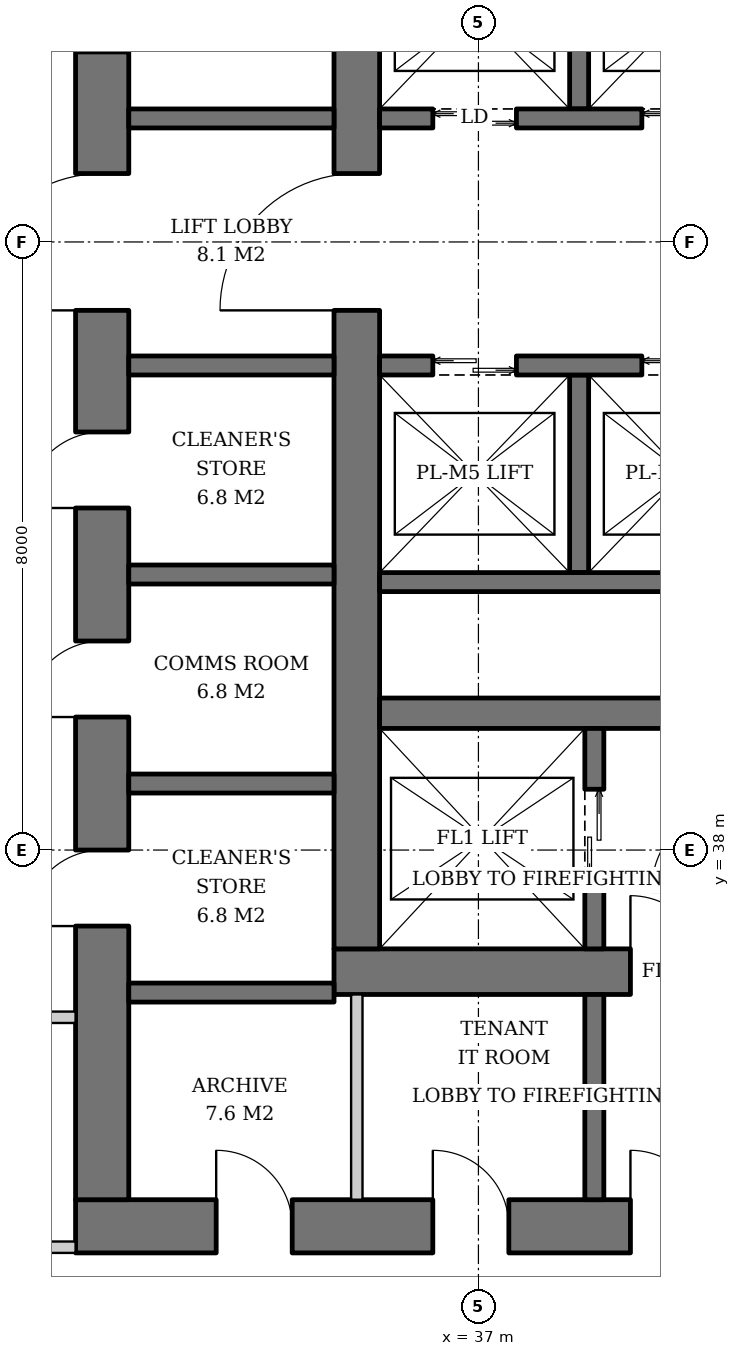
"""IFC4 building model, lengths in metres.
Left out: names, types, materials, properties, quantities, classifications, styles, units other than length and angle.
Written with IfcOpenShell. Run it as: python <this file> out.ifc"""

import sys

from ifc_helpers import new_model, si_unit, direction, frame, frame_2d, origin, place, context, subcontext, project, spatial, rectangle, extrude, element, fill, save


model = new_model("IFC4")
c1 = context("Model", 3, precision=1e-05, world=origin(), true_north=direction((0.0, 1.0)))
c2 = subcontext(c1, "Body", "Model", "MODEL_VIEW")
j1 = project(units=[si_unit("LENGTHUNIT", "METRE"), si_unit("PLANEANGLEUNIT", "RADIAN")], contexts=[c1])
p1 = place(None, origin())
s1 = spatial("IfcSite", under=j1, at=p1, CompositionType="ELEMENT")
p2 = place(p1, origin())
s2 = spatial("IfcBuilding", under=s1, at=p2, CompositionType="ELEMENT")
p3 = place(p2, frame((0.0, 0.0, 150.2)))
s3 = spatial("IfcBuildingStorey", under=s2, at=p3, CompositionType="ELEMENT", Elevation=150.2)
p4 = place(p3, frame((35.1, 36.4, 0.0), z_axis=(0.0, 0.0, 1.0), x_axis=(1.0, 0.0, 0.0)))
e1 = element("IfcWall", 1, at=p4, inside=s3, PredefinedType="SHEAR", context=c2, shape_type="SweptSolid", body=[
    extrude(rectangle(XDim=19.8, YDim=0.6, at=frame_2d((9.9, 0.0))), origin(), (0.0, 0.0, 1.0), 3.8),
])
p5 = place(p4, frame((3.9, 0.0, 0.0)))
e2 = element("IfcOpeningElement", 2, at=p5, cuts=e1, PredefinedType="OPENING", context=c2, shape_type="SweptSolid", body=[
    extrude(rectangle(XDim=1.0, YDim=2.1, at=frame_2d((0.5, 1.05))), frame((0.0, 0.31, 0.0), z_axis=(0.0, -1.0, 0.0), x_axis=(1.0, 0.0, 0.0)), (0.0, 0.0, 1.0), 0.62),
])
p6 = place(p4, frame((15.35, 0.0, 0.0)))
e3 = element("IfcOpeningElement", 3, at=p6, cuts=e1, PredefinedType="OPENING", context=c2, shape_type="SweptSolid", body=[
    extrude(rectangle(XDim=1.0, YDim=2.1, at=frame_2d((0.5, 1.05))), frame((0.0, 0.31, 0.0), z_axis=(0.0, -1.0, 0.0), x_axis=(1.0, 0.0, 0.0)), (0.0, 0.0, 1.0), 0.62),
])
p7 = place(p3, frame((35.4, 36.7, 0.0), z_axis=(0.0, 0.0, 1.0), x_axis=(0.0, 1.0, 0.0)))
e4 = element("IfcWall", 4, at=p7, inside=s3, PredefinedType="SHEAR", context=c2, shape_type="SweptSolid", body=[
    extrude(rectangle(XDim=18.6, YDim=0.6, at=frame_2d((9.3, 0.0))), origin(), (0.0, 0.0, 1.0), 3.8),
])
p8 = place(p7, frame((8.4, 0.0, 0.0)))
e5 = element("IfcOpeningElement", 5, at=p8, cuts=e4, PredefinedType="OPENING", context=c2, shape_type="SweptSolid", body=[
    extrude(rectangle(XDim=1.8, YDim=2.4, at=frame_2d((0.9, 1.2))), frame((0.0, 0.31, 0.0), z_axis=(0.0, -1.0, 0.0), x_axis=(1.0, 0.0, 0.0)), (0.0, 0.0, 1.0), 0.62),
])
p9 = place(p3, frame((31.7, 33.05, 0.0), z_axis=(0.0, 0.0, 1.0), x_axis=(1.0, 0.0, 0.0)))
e6 = element("IfcWall", 6, at=p9, inside=s3, PredefinedType="SHEAR", context=c2, shape_type="SweptSolid", body=[
    extrude(rectangle(XDim=26.6, YDim=0.7, at=frame_2d((13.3, 0.0))), origin(), (0.0, 0.0, 1.0), 3.8),
])
p10 = place(p9, frame((7.3, 0.0, 0.0)))
e7 = element("IfcOpeningElement", 7, at=p10, cuts=e6, PredefinedType="OPENING", context=c2, shape_type="SweptSolid", body=[
    extrude(rectangle(XDim=1.0, YDim=2.1, at=frame_2d((0.5, 1.05))), frame((0.0, 0.36, 0.0), z_axis=(0.0, -1.0, 0.0), x_axis=(1.0, 0.0, 0.0)), (0.0, 0.0, 1.0), 0.72),
])
p11 = place(p9, frame((18.75, 0.0, 0.0)))
e8 = element("IfcOpeningElement", 8, at=p11, cuts=e6, PredefinedType="OPENING", context=c2, shape_type="SweptSolid", body=[
    extrude(rectangle(XDim=1.0, YDim=2.1, at=frame_2d((0.5, 1.05))), frame((0.0, 0.36, 0.0), z_axis=(0.0, -1.0, 0.0), x_axis=(1.0, 0.0, 0.0)), (0.0, 0.0, 1.0), 0.72),
])
p12 = place(p9, frame((1.85, 0.0, 0.0)))
e9 = element("IfcOpeningElement", 9, at=p12, cuts=e6, PredefinedType="OPENING", context=c2, shape_type="SweptSolid", body=[
    extrude(rectangle(XDim=1.0, YDim=2.1, at=frame_2d((0.5, 1.05))), frame((0.0, 0.36, 0.0), z_axis=(0.0, -1.0, 0.0), x_axis=(1.0, 0.0, 0.0)), (0.0, 0.0, 1.0), 0.72),
])
p13 = place(p9, frame((4.7, 0.0, 0.0)))
e10 = element("IfcOpeningElement", 10, at=p13, cuts=e6, PredefinedType="OPENING", context=c2, shape_type="SweptSolid", body=[
    extrude(rectangle(XDim=1.0, YDim=2.1, at=frame_2d((0.5, 1.05))), frame((0.0, 0.36, 0.0), z_axis=(0.0, -1.0, 0.0), x_axis=(1.0, 0.0, 0.0)), (0.0, 0.0, 1.0), 0.72),
])
p14 = place(p9, frame((12.44, 0.0, 0.0)))
e11 = element("IfcOpeningElement", 11, at=p14, cuts=e6, PredefinedType="OPENING", context=c2, shape_type="SweptSolid", body=[
    extrude(rectangle(XDim=1.0, YDim=2.1, at=frame_2d((0.5, 1.05))), frame((0.0, 0.36, 0.0), z_axis=(0.0, -1.0, 0.0), x_axis=(1.0, 0.0, 0.0)), (0.0, 0.0, 1.0), 0.72),
])
p15 = place(p9, frame((20.644, 0.0, 0.0)))
e12 = element("IfcOpeningElement", 12, at=p15, cuts=e6, PredefinedType="OPENING", context=c2, shape_type="SweptSolid", body=[
    extrude(rectangle(XDim=1.0, YDim=2.1, at=frame_2d((0.5, 1.05))), frame((0.0, 0.36, 0.0), z_axis=(0.0, -1.0, 0.0), x_axis=(1.0, 0.0, 0.0)), (0.0, 0.0, 1.0), 0.72),
])
p16 = place(p9, frame((23.544, 0.0, 0.0)))
e13 = element("IfcOpeningElement", 13, at=p16, cuts=e6, PredefinedType="OPENING", context=c2, shape_type="SweptSolid", body=[
    extrude(rectangle(XDim=1.0, YDim=2.1, at=frame_2d((0.5, 1.05))), frame((0.0, 0.36, 0.0), z_axis=(0.0, -1.0, 0.0), x_axis=(1.0, 0.0, 0.0)), (0.0, 0.0, 1.0), 0.72),
])
p17 = place(p3, frame((32.05, 33.4, 0.0), z_axis=(0.0, 0.0, 1.0), x_axis=(0.0, 1.0, 0.0)))
e14 = element("IfcWall", 14, at=p17, inside=s3, PredefinedType="SHEAR", context=c2, shape_type="SweptSolid", body=[
    extrude(rectangle(XDim=25.2, YDim=0.7, at=frame_2d((12.6, 0.0))), origin(), (0.0, 0.0, 1.0), 3.8),
])
p18 = place(p17, frame((11.7, 0.0, 0.0)))
e15 = element("IfcOpeningElement", 15, at=p18, cuts=e14, PredefinedType="OPENING", context=c2, shape_type="SweptSolid", body=[
    extrude(rectangle(XDim=1.8, YDim=2.4, at=frame_2d((0.9, 1.2))), frame((0.0, 0.36, 0.0), z_axis=(0.0, -1.0, 0.0), x_axis=(1.0, 0.0, 0.0)), (0.0, 0.0, 1.0), 0.72),
])
p19 = place(p17, frame((3.6, 0.0, 0.0)))
e16 = element("IfcOpeningElement", 16, at=p19, cuts=e14, PredefinedType="OPENING", context=c2, shape_type="SweptSolid", body=[
    extrude(rectangle(XDim=1.0, YDim=2.1, at=frame_2d((0.5, 1.05))), frame((0.0, 0.36, 0.0), z_axis=(0.0, -1.0, 0.0), x_axis=(1.0, 0.0, 0.0)), (0.0, 0.0, 1.0), 0.72),
])
p20 = place(p17, frame((6.35, 0.0, 0.0)))
e17 = element("IfcOpeningElement", 17, at=p20, cuts=e14, PredefinedType="OPENING", context=c2, shape_type="SweptSolid", body=[
    extrude(rectangle(XDim=1.0, YDim=2.1, at=frame_2d((0.5, 1.05))), frame((0.0, 0.36, 0.0), z_axis=(0.0, -1.0, 0.0), x_axis=(1.0, 0.0, 0.0)), (0.0, 0.0, 1.0), 0.72),
])
p21 = place(p17, frame((9.1, 0.0, 0.0)))
e18 = element("IfcOpeningElement", 18, at=p21, cuts=e14, PredefinedType="OPENING", context=c2, shape_type="SweptSolid", body=[
    extrude(rectangle(XDim=1.0, YDim=2.1, at=frame_2d((0.5, 1.05))), frame((0.0, 0.36, 0.0), z_axis=(0.0, -1.0, 0.0), x_axis=(1.0, 0.0, 0.0)), (0.0, 0.0, 1.0), 0.72),
])
p22 = place(p17, frame((15.1, 0.0, 0.0)))
e19 = element("IfcOpeningElement", 19, at=p22, cuts=e14, PredefinedType="OPENING", context=c2, shape_type="SweptSolid", body=[
    extrude(rectangle(XDim=1.0, YDim=2.1, at=frame_2d((0.5, 1.05))), frame((0.0, 0.36, 0.0), z_axis=(0.0, -1.0, 0.0), x_axis=(1.0, 0.0, 0.0)), (0.0, 0.0, 1.0), 0.72),
])
p23 = place(p17, frame((17.85, 0.0, 0.0)))
e20 = element("IfcOpeningElement", 20, at=p23, cuts=e14, PredefinedType="OPENING", context=c2, shape_type="SweptSolid", body=[
    extrude(rectangle(XDim=1.0, YDim=2.1, at=frame_2d((0.5, 1.05))), frame((0.0, 0.36, 0.0), z_axis=(0.0, -1.0, 0.0), x_axis=(1.0, 0.0, 0.0)), (0.0, 0.0, 1.0), 0.72),
])
p24 = place(p3, frame((35.7, 39.8, 0.0), z_axis=(0.0, 0.0, 1.0), x_axis=(1.0, 0.0, 0.0)))
e21 = element("IfcWall", 21, at=p24, inside=s3, PredefinedType="SHEAR", context=c2, shape_type="SweptSolid", body=[
    extrude(rectangle(XDim=18.6, YDim=0.4, at=frame_2d((9.3, 0.0))), origin(), (0.0, 0.0, 1.0), 3.8),
])
p25 = place(p3, frame((38.525, 36.7, 0.0), z_axis=(0.0, 0.0, 1.0), x_axis=(0.0, 1.0, 0.0)))
e22 = element("IfcWall", 22, at=p25, inside=s3, PredefinedType="SHEAR", context=c2, shape_type="SweptSolid", body=[
    extrude(rectangle(XDim=2.9, YDim=0.25, at=frame_2d((1.45, 0.0))), origin(), (0.0, 0.0, 1.0), 3.8),
])
p26 = place(p25, frame((0.8, 0.0, 0.0)))
e23 = element("IfcOpeningElement", 23, at=p26, cuts=e22, PredefinedType="OPENING", context=c2, shape_type="SweptSolid", body=[
    extrude(rectangle(XDim=1.3, YDim=2.2, at=frame_2d((0.65, 1.1))), frame((0.0, 0.135, 0.0), z_axis=(0.0, -1.0, 0.0), x_axis=(1.0, 0.0, 0.0)), (0.0, 0.0, 1.0), 0.27),
])
p27 = place(p3, frame((38.325, 47.75, 0.0), z_axis=(0.0, 0.0, 1.0), x_axis=(0.0, 1.0, 0.0)))
e24 = element("IfcWall", 24, at=p27, inside=s3, PredefinedType="SHEAR", context=c2, shape_type="SweptSolid", body=[
    extrude(rectangle(XDim=2.6, YDim=0.25, at=frame_2d((1.3, 0.0))), origin(), (0.0, 0.0, 1.0), 3.8),
])
p28 = place(p3, frame((35.7, 47.625, 0.0), z_axis=(0.0, 0.0, 1.0), x_axis=(1.0, 0.0, 0.0)))
e25 = element("IfcWall", 25, at=p28, inside=s3, PredefinedType="SHEAR", context=c2, shape_type="SweptSolid", body=[
    extrude(rectangle(XDim=12.83, YDim=0.25, at=frame_2d((6.415, 0.0))), origin(), (0.0, 0.0, 1.0), 3.8),
])
p29 = place(p28, frame((0.7, 0.0, 0.0)))
e26 = element("IfcOpeningElement", 26, at=p29, cuts=e25, PredefinedType="OPENING", context=c2, shape_type="SweptSolid", body=[
    extrude(rectangle(XDim=1.1, YDim=2.2, at=frame_2d((0.55, 1.1))), frame((0.0, 0.135, 0.0), z_axis=(0.0, -1.0, 0.0), x_axis=(1.0, 0.0, 0.0)), (0.0, 0.0, 1.0), 0.27),
])
p30 = place(p28, frame((3.45, 0.0, 0.0)))
e27 = element("IfcOpeningElement", 27, at=p30, cuts=e25, PredefinedType="OPENING", context=c2, shape_type="SweptSolid", body=[
    extrude(rectangle(XDim=1.1, YDim=2.2, at=frame_2d((0.55, 1.1))), frame((0.0, 0.135, 0.0), z_axis=(0.0, -1.0, 0.0), x_axis=(1.0, 0.0, 0.0)), (0.0, 0.0, 1.0), 0.27),
])
p31 = place(p28, frame((6.2, 0.0, 0.0)))
e28 = element("IfcOpeningElement", 28, at=p31, cuts=e25, PredefinedType="OPENING", context=c2, shape_type="SweptSolid", body=[
    extrude(rectangle(XDim=1.1, YDim=2.2, at=frame_2d((0.55, 1.1))), frame((0.0, 0.135, 0.0), z_axis=(0.0, -1.0, 0.0), x_axis=(1.0, 0.0, 0.0)), (0.0, 0.0, 1.0), 0.27),
])
p32 = place(p28, frame((8.95, 0.0, 0.0)))
e29 = element("IfcOpeningElement", 29, at=p32, cuts=e25, PredefinedType="OPENING", context=c2, shape_type="SweptSolid", body=[
    extrude(rectangle(XDim=1.1, YDim=2.2, at=frame_2d((0.55, 1.1))), frame((0.0, 0.135, 0.0), z_axis=(0.0, -1.0, 0.0), x_axis=(1.0, 0.0, 0.0)), (0.0, 0.0, 1.0), 0.27),
])
p33 = place(p28, frame((11.515, 0.0, 0.0)))
e30 = element("IfcOpeningElement", 30, at=p33, cuts=e25, PredefinedType="OPENING", context=c2, shape_type="SweptSolid", body=[
    extrude(rectangle(XDim=0.8, YDim=2.0, at=frame_2d((0.4, 1.0))), frame((0.0, 0.135, 0.0), z_axis=(0.0, -1.0, 0.0), x_axis=(1.0, 0.0, 0.0)), (0.0, 0.0, 1.0), 0.27),
])
p34 = place(p3, frame((38.325, 44.25, 0.0), z_axis=(0.0, 0.0, 1.0), x_axis=(0.0, -1.0, 0.0)))
e31 = element("IfcWall", 31, at=p34, inside=s3, PredefinedType="SHEAR", context=c2, shape_type="SweptSolid", body=[
    extrude(rectangle(XDim=2.6, YDim=0.25, at=frame_2d((1.3, 0.0))), origin(), (0.0, 0.0, 1.0), 3.8),
])
p35 = place(p3, frame((35.7, 41.525, 0.0), z_axis=(0.0, 0.0, 1.0), x_axis=(1.0, 0.0, 0.0)))
e32 = element("IfcWall", 32, at=p35, inside=s3, PredefinedType="SHEAR", context=c2, shape_type="SweptSolid", body=[
    extrude(rectangle(XDim=11.0, YDim=0.25, at=frame_2d((5.5, 0.0))), origin(), (0.0, 0.0, 1.0), 3.8),
])
p36 = place(p3, frame((35.7, 44.375, 0.0), z_axis=(0.0, 0.0, 1.0), x_axis=(1.0, 0.0, 0.0)))
e33 = element("IfcWall", 33, at=p36, inside=s3, PredefinedType="SHEAR", context=c2, shape_type="SweptSolid", body=[
    extrude(rectangle(XDim=12.83, YDim=0.25, at=frame_2d((6.415, 0.0))), origin(), (0.0, 0.0, 1.0), 3.8),
])
p37 = place(p36, frame((0.7, 0.0, 0.0)))
e34 = element("IfcOpeningElement", 34, at=p37, cuts=e33, PredefinedType="OPENING", context=c2, shape_type="SweptSolid", body=[
    extrude(rectangle(XDim=1.1, YDim=2.2, at=frame_2d((0.55, 1.1))), frame((0.0, 0.135, 0.0), z_axis=(0.0, -1.0, 0.0), x_axis=(1.0, 0.0, 0.0)), (0.0, 0.0, 1.0), 0.27),
])
p38 = place(p36, frame((3.45, 0.0, 0.0)))
e35 = element("IfcOpeningElement", 35, at=p38, cuts=e33, PredefinedType="OPENING", context=c2, shape_type="SweptSolid", body=[
    extrude(rectangle(XDim=1.1, YDim=2.2, at=frame_2d((0.55, 1.1))), frame((0.0, 0.135, 0.0), z_axis=(0.0, -1.0, 0.0), x_axis=(1.0, 0.0, 0.0)), (0.0, 0.0, 1.0), 0.27),
])
p39 = place(p36, frame((6.2, 0.0, 0.0)))
e36 = element("IfcOpeningElement", 36, at=p39, cuts=e33, PredefinedType="OPENING", context=c2, shape_type="SweptSolid", body=[
    extrude(rectangle(XDim=1.1, YDim=2.2, at=frame_2d((0.55, 1.1))), frame((0.0, 0.135, 0.0), z_axis=(0.0, -1.0, 0.0), x_axis=(1.0, 0.0, 0.0)), (0.0, 0.0, 1.0), 0.27),
])
p40 = place(p36, frame((8.95, 0.0, 0.0)))
e37 = element("IfcOpeningElement", 37, at=p40, cuts=e33, PredefinedType="OPENING", context=c2, shape_type="SweptSolid", body=[
    extrude(rectangle(XDim=1.1, YDim=2.2, at=frame_2d((0.55, 1.1))), frame((0.0, 0.135, 0.0), z_axis=(0.0, -1.0, 0.0), x_axis=(1.0, 0.0, 0.0)), (0.0, 0.0, 1.0), 0.27),
])
p41 = place(p36, frame((11.515, 0.0, 0.0)))
e38 = element("IfcOpeningElement", 38, at=p41, cuts=e33, PredefinedType="OPENING", context=c2, shape_type="SweptSolid", body=[
    extrude(rectangle(XDim=0.8, YDim=2.0, at=frame_2d((0.4, 1.0))), frame((0.0, 0.135, 0.0), z_axis=(0.0, -1.0, 0.0), x_axis=(1.0, 0.0, 0.0)), (0.0, 0.0, 1.0), 0.27),
])
for number, where, z_axis, x_axis in (
    (39, (32.4, 36.125, 0.0), (0.0, 0.0, 1.0), (1.0, 0.0, 0.0)),
    (40, (32.4, 38.875, 0.0), (0.0, 0.0, 1.0), (1.0, 0.0, 0.0)),
    (41, (32.4, 41.625, 0.0), (0.0, 0.0, 1.0), (1.0, 0.0, 0.0)),
    (42, (32.4, 44.375, 0.0), (0.0, 0.0, 1.0), (1.0, 0.0, 0.0)),
    (43, (32.4, 47.625, 0.0), (0.0, 0.0, 1.0), (1.0, 0.0, 0.0)),
):
    element("IfcWall", number, at=place(p3, frame(where, z_axis=z_axis, x_axis=x_axis)), inside=s3, PredefinedType="SHEAR", context=c2, shape_type="SweptSolid", body=[
        extrude(rectangle(XDim=2.7, YDim=0.25, at=frame_2d((1.35, 0.0))), origin(), (0.0, 0.0, 1.0), 3.8),
    ])
p42 = place(p3, frame((38.525, 33.4, 0.0), z_axis=(0.0, 0.0, 1.0), x_axis=(0.0, 1.0, 0.0)))
e44 = element("IfcWall", 44, at=p42, inside=s3, PredefinedType="SOLIDWALL", context=c2, shape_type="SweptSolid", body=[
    extrude(rectangle(XDim=2.7, YDim=0.25, at=frame_2d((1.35, 0.0))), origin(), (0.0, 0.0, 1.0), 3.62),
])
p43 = place(p3, frame((35.4, 33.4, 0.0), z_axis=(0.0, 0.0, 1.0), x_axis=(0.0, 1.0, 0.0)))
e45 = element("IfcWall", 45, at=p43, inside=s3, PredefinedType="SOLIDWALL", context=c2, shape_type="SweptSolid", body=[
    extrude(rectangle(XDim=2.7, YDim=0.15, at=frame_2d((1.35, 0.0))), origin(), (0.0, 0.0, 1.0), 3.62),
])
for number, where, z_axis, x_axis in (
    (46, (31.7, 35.8, 0.0), (0.0, 0.0, 1.0), (-1.0, 0.0, 0.0)),
    (47, (31.7, 32.775, 0.0), (0.0, 0.0, 1.0), (-1.0, 0.0, 0.0)),
):
    element("IfcWall", number, at=place(p3, frame(where, z_axis=z_axis, x_axis=x_axis)), inside=s3, PredefinedType="PARTITIONING", context=c2, shape_type="SweptSolid", body=[
        extrude(rectangle(XDim=2.325, YDim=0.15, at=frame_2d((1.163, 0.0))), origin(), (0.0, 0.0, 1.0), 3.62),
    ])
p44 = place(p26, origin())
e48 = element("IfcDoor", 48, at=p44, inside=s3, OperationType="DOUBLE_DOOR_SLIDING", PredefinedType="DOOR", context=c2, shape_type="SweptSolid", body=[
    extrude(rectangle(XDim=1.3, YDim=2.2, at=frame_2d((0.65, 1.1))), frame((0.0, 0.025, 0.0), z_axis=(0.0, -1.0, 0.0), x_axis=(1.0, 0.0, 0.0)), (0.0, 0.0, 1.0), 0.05),
])
fill(e23, e48)
p45 = place(p29, origin())
e49 = element("IfcDoor", 49, at=p45, inside=s3, OperationType="DOUBLE_DOOR_SLIDING", PredefinedType="DOOR", context=c2, shape_type="SweptSolid", body=[
    extrude(rectangle(XDim=1.1, YDim=2.2, at=frame_2d((0.55, 1.1))), frame((0.0, 0.025, 0.0), z_axis=(0.0, -1.0, 0.0), x_axis=(1.0, 0.0, 0.0)), (0.0, 0.0, 1.0), 0.05),
])
fill(e26, e49)
p46 = place(p30, origin())
e50 = element("IfcDoor", 50, at=p46, inside=s3, OperationType="DOUBLE_DOOR_SLIDING", PredefinedType="DOOR", context=c2, shape_type="SweptSolid", body=[
    extrude(rectangle(XDim=1.1, YDim=2.2, at=frame_2d((0.55, 1.1))), frame((0.0, 0.025, 0.0), z_axis=(0.0, -1.0, 0.0), x_axis=(1.0, 0.0, 0.0)), (0.0, 0.0, 1.0), 0.05),
])
fill(e27, e50)
p47 = place(p37, origin())
e51 = element("IfcDoor", 51, at=p47, inside=s3, OperationType="DOUBLE_DOOR_SLIDING", PredefinedType="DOOR", context=c2, shape_type="SweptSolid", body=[
    extrude(rectangle(XDim=1.1, YDim=2.2, at=frame_2d((0.55, 1.1))), frame((0.0, 0.025, 0.0), z_axis=(0.0, -1.0, 0.0), x_axis=(1.0, 0.0, 0.0)), (0.0, 0.0, 1.0), 0.05),
])
fill(e34, e51)
p48 = place(p38, origin())
e52 = element("IfcDoor", 52, at=p48, inside=s3, OperationType="DOUBLE_DOOR_SLIDING", PredefinedType="DOOR", context=c2, shape_type="SweptSolid", body=[
    extrude(rectangle(XDim=1.1, YDim=2.2, at=frame_2d((0.55, 1.1))), frame((0.0, 0.025, 0.0), z_axis=(0.0, -1.0, 0.0), x_axis=(1.0, 0.0, 0.0)), (0.0, 0.0, 1.0), 0.05),
])
fill(e35, e52)
p49 = place(p5, origin())
e53 = element("IfcDoor", 53, at=p49, inside=s3, OperationType="SINGLE_SWING_LEFT", PredefinedType="DOOR", context=c2, shape_type="SweptSolid", body=[
    extrude(rectangle(XDim=1.0, YDim=2.1, at=frame_2d((0.5, 1.05))), frame((0.0, 0.025, 0.0), z_axis=(0.0, -1.0, 0.0), x_axis=(1.0, 0.0, 0.0)), (0.0, 0.0, 1.0), 0.05),
])
fill(e2, e53)
p50 = place(p8, origin())
e54 = element("IfcDoor", 54, at=p50, inside=s3, OperationType="DOUBLE_DOOR_SINGLE_SWING", PredefinedType="DOOR", context=c2, shape_type="SweptSolid", body=[
    extrude(rectangle(XDim=1.8, YDim=2.4, at=frame_2d((0.9, 1.2))), frame((0.0, 0.025, 0.0), z_axis=(0.0, -1.0, 0.0), x_axis=(1.0, 0.0, 0.0)), (0.0, 0.0, 1.0), 0.05),
])
fill(e5, e54)
p51 = place(p18, origin())
e55 = element("IfcDoor", 55, at=p51, inside=s3, OperationType="DOUBLE_DOOR_SINGLE_SWING", PredefinedType="DOOR", context=c2, shape_type="SweptSolid", body=[
    extrude(rectangle(XDim=1.8, YDim=2.4, at=frame_2d((0.9, 1.2))), frame((0.0, 0.025, 0.0), z_axis=(0.0, -1.0, 0.0), x_axis=(1.0, 0.0, 0.0)), (0.0, 0.0, 1.0), 0.05),
])
fill(e15, e55)
p52 = place(p10, origin())
e56 = element("IfcDoor", 56, at=p52, inside=s3, OperationType="SINGLE_SWING_LEFT", PredefinedType="DOOR", context=c2, shape_type="SweptSolid", body=[
    extrude(rectangle(XDim=1.0, YDim=2.1, at=frame_2d((0.5, 1.05))), frame((0.0, 0.025, 0.0), z_axis=(0.0, -1.0, 0.0), x_axis=(1.0, 0.0, 0.0)), (0.0, 0.0, 1.0), 0.05),
])
fill(e7, e56)
p53 = place(p19, origin())
e57 = element("IfcDoor", 57, at=p53, inside=s3, OperationType="SINGLE_SWING_LEFT", PredefinedType="DOOR", context=c2, shape_type="SweptSolid", body=[
    extrude(rectangle(XDim=1.0, YDim=2.1, at=frame_2d((0.5, 1.05))), frame((0.0, -0.29, 0.0), z_axis=(0.0, -1.0, 0.0), x_axis=(1.0, 0.0, 0.0)), (0.0, 0.0, 1.0), 0.05),
])
fill(e16, e57)
p54 = place(p20, origin())
e58 = element("IfcDoor", 58, at=p54, inside=s3, OperationType="SINGLE_SWING_LEFT", PredefinedType="DOOR", context=c2, shape_type="SweptSolid", body=[
    extrude(rectangle(XDim=1.0, YDim=2.1, at=frame_2d((0.5, 1.05))), frame((0.0, -0.29, 0.0), z_axis=(0.0, -1.0, 0.0), x_axis=(1.0, 0.0, 0.0)), (0.0, 0.0, 1.0), 0.05),
])
fill(e17, e58)
p55 = place(p21, origin())
e59 = element("IfcDoor", 59, at=p55, inside=s3, OperationType="SINGLE_SWING_LEFT", PredefinedType="DOOR", context=c2, shape_type="SweptSolid", body=[
    extrude(rectangle(XDim=1.0, YDim=2.1, at=frame_2d((0.5, 1.05))), frame((0.0, -0.29, 0.0), z_axis=(0.0, -1.0, 0.0), x_axis=(1.0, 0.0, 0.0)), (0.0, 0.0, 1.0), 0.05),
])
fill(e18, e59)
p56 = place(p12, origin())
e60 = element("IfcDoor", 60, at=p56, inside=s3, OperationType="SINGLE_SWING_LEFT", PredefinedType="DOOR", context=c2, shape_type="SweptSolid", body=[
    extrude(rectangle(XDim=1.0, YDim=2.1, at=frame_2d((0.5, 1.05))), frame((0.0, 0.34, 0.0), z_axis=(0.0, -1.0, 0.0), x_axis=(1.0, 0.0, 0.0)), (0.0, 0.0, 1.0), 0.05),
])
fill(e9, e60)
p57 = place(p13, origin())
e61 = element("IfcDoor", 61, at=p57, inside=s3, OperationType="SINGLE_SWING_LEFT", PredefinedType="DOOR", context=c2, shape_type="SweptSolid", body=[
    extrude(rectangle(XDim=1.0, YDim=2.1, at=frame_2d((0.5, 1.05))), frame((0.0, 0.34, 0.0), z_axis=(0.0, -1.0, 0.0), x_axis=(1.0, 0.0, 0.0)), (0.0, 0.0, 1.0), 0.05),
])
fill(e10, e61)
save(model, sys.argv[1])
